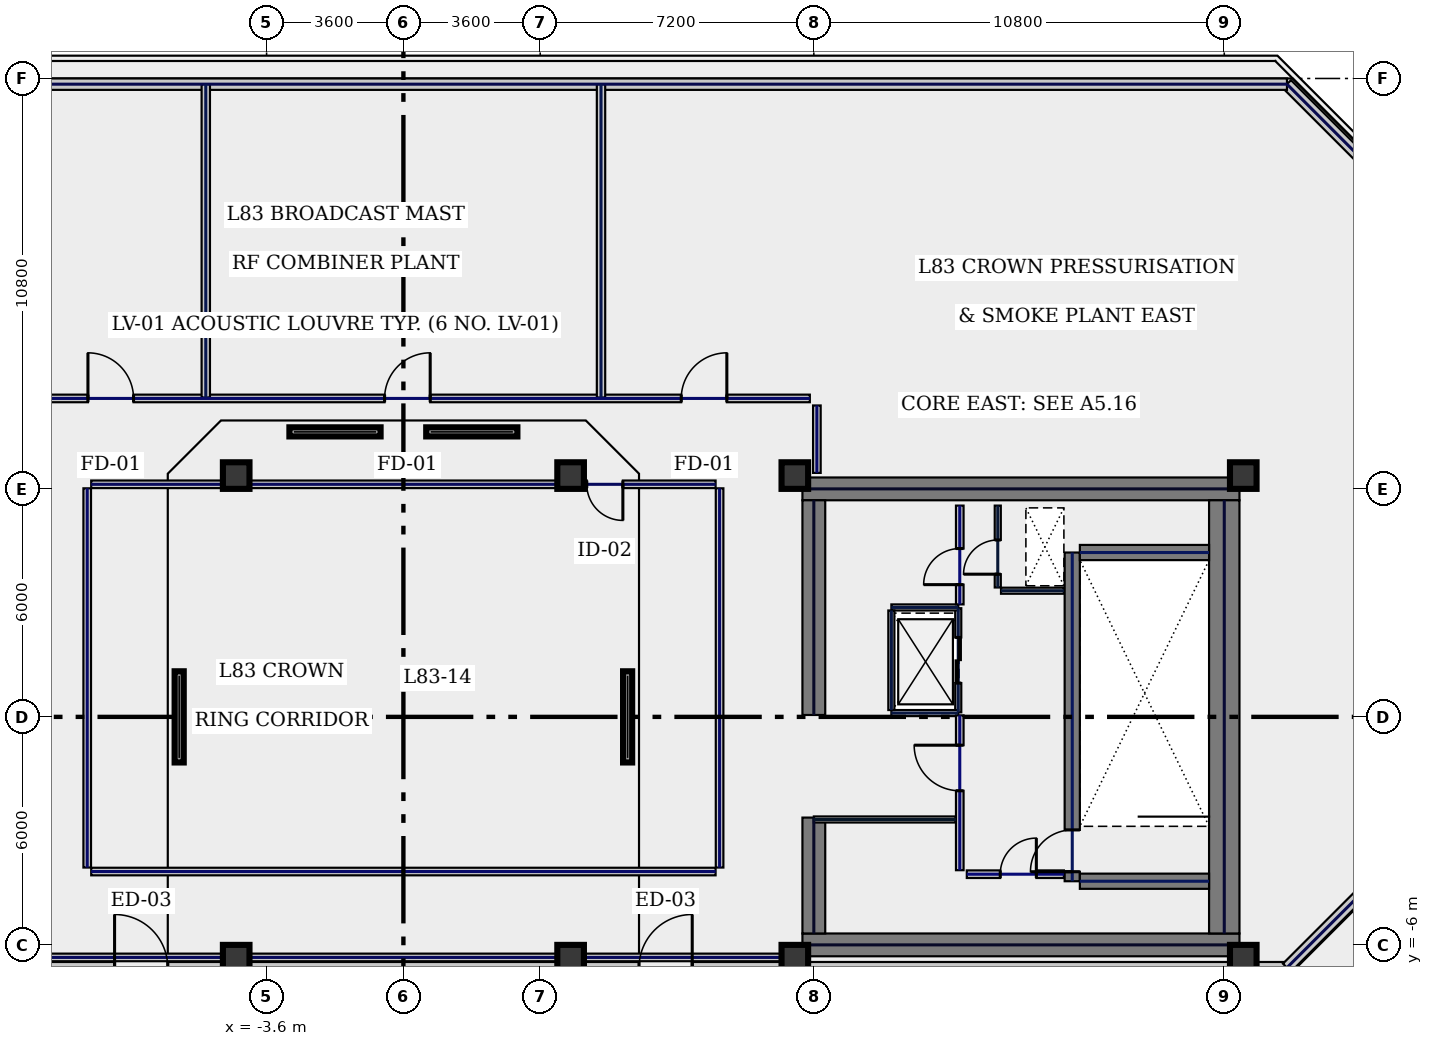
"""IFC4 building model, lengths in metres.
Left out: names, types, materials, properties, quantities, classifications, styles, units other than length and angle.
Written with IfcOpenShell. Run it as: python <this file> out.ifc"""

import sys

from ifc_helpers import new_model, si_unit, direction, frame, frame_2d, origin, origin_2d, place, context, subcontext, project, spatial, rectangle, hollow_rectangle, extrude, element, fill, save


model = new_model("IFC4")
c1 = context("Model", 3, precision=1e-05, world=origin(), true_north=direction((0.0, 1.0)))
c2 = subcontext(c1, "Body", "Model", "MODEL_VIEW")
j1 = project(units=[si_unit("LENGTHUNIT", "METRE"), si_unit("PLANEANGLEUNIT", "RADIAN")], contexts=[c1])
p1 = place(None, origin())
s1 = spatial("IfcSite", under=j1, at=p1, CompositionType="ELEMENT")
p2 = place(p1, origin())
s2 = spatial("IfcBuilding", under=s1, at=p2, CompositionType="ELEMENT")
p3 = place(p2, frame((0.0, 0.0, 357.0)))
s3 = spatial("IfcBuildingStorey", under=s2, at=p3, CompositionType="ELEMENT", Elevation=357.0)
for number, where, z_axis, x_axis in (
    (1, (10.5, 6.0, 0.0), (0.0, 0.0, 1.0), (1.0, 0.0, 0.0)),
    (2, (10.5, -6.0, 0.0), (0.0, 0.0, 1.0), (1.0, 0.0, 0.0)),
):
    element("IfcWall", number, at=place(p3, frame(where, z_axis=z_axis, x_axis=x_axis)), inside=s3, PredefinedType="SHEAR", context=c2, shape_type="SweptSolid", body=[
        extrude(rectangle(XDim=11.5, YDim=0.6, at=frame_2d((5.75, 0.0))), origin(), (0.0, 0.0, 1.0), 3.7),
    ])
p4 = place(p3, frame((21.6, -5.7, 0.0), z_axis=(0.0, 0.0, 1.0), x_axis=(0.0, 1.0, 0.0)))
e3 = element("IfcWall", 3, at=p4, inside=s3, PredefinedType="SHEAR", context=c2, shape_type="SweptSolid", body=[
    extrude(rectangle(XDim=11.4, YDim=0.8, at=frame_2d((5.7, 0.0))), origin(), (0.0, 0.0, 1.0), 3.7),
])
p5 = place(p3, frame((10.8, -5.7, 0.0), z_axis=(0.0, 0.0, 1.0), x_axis=(0.0, 1.0, 0.0)))
e4 = element("IfcWall", 4, at=p5, inside=s3, PredefinedType="SHEAR", context=c2, shape_type="SweptSolid", body=[
    extrude(rectangle(XDim=3.05, YDim=0.6, at=frame_2d((1.525, 0.0))), origin(), (0.0, 0.0, 1.0), 3.7),
])
p6 = place(p3, frame((10.8, 0.05, 0.0), z_axis=(0.0, 0.0, 1.0), x_axis=(0.0, 1.0, 0.0)))
e5 = element("IfcWall", 5, at=p6, inside=s3, PredefinedType="SHEAR", context=c2, shape_type="SweptSolid", body=[
    extrude(rectangle(XDim=5.65, YDim=0.6, at=frame_2d((2.825, 0.0))), origin(), (0.0, 0.0, 1.0), 3.7),
])
p7 = place(p3, frame((17.6, -4.325, 0.0), z_axis=(0.0, 0.0, 1.0), x_axis=(0.0, 1.0, 0.0)))
e6 = element("IfcWall", 6, at=p7, inside=s3, PredefinedType="SHEAR", context=c2, shape_type="SweptSolid", body=[
    extrude(rectangle(XDim=8.65, YDim=0.4, at=frame_2d((4.325, 0.0))), origin(), (0.0, 0.0, 1.0), 3.7),
])
p8 = place(p7, frame((0.25, 0.0, 0.0)))
e7 = element("IfcOpeningElement", 7, at=p8, cuts=e6, PredefinedType="OPENING", context=c2, shape_type="SweptSolid", body=[
    extrude(rectangle(XDim=1.1, YDim=2.2, at=frame_2d((0.55, 1.1))), frame((0.0, 0.21, 0.0), z_axis=(0.0, -1.0, 0.0), x_axis=(1.0, 0.0, 0.0)), (0.0, 0.0, 1.0), 0.42),
])
for number, where, z_axis, x_axis in (
    (8, (17.8, -4.325, 0.0), (0.0, 0.0, 1.0), (1.0, 0.0, 0.0)),
    (9, (17.8, 4.325, 0.0), (0.0, 0.0, 1.0), (1.0, 0.0, 0.0)),
):
    element("IfcWall", number, at=place(p3, frame(where, z_axis=z_axis, x_axis=x_axis)), inside=s3, PredefinedType="SHEAR", context=c2, shape_type="SweptSolid", body=[
        extrude(rectangle(XDim=3.4, YDim=0.4, at=frame_2d((1.7, 0.0))), origin(), (0.0, 0.0, 1.0), 3.7),
    ])
for number, where, z_axis, x_axis in (
    (10, (10.3, -6.35, 0.0), (0.0, 0.0, 1.0), (1.0, 0.0, 0.0)),
    (11, (10.3, 6.35, 0.0), (0.0, 0.0, 1.0), (1.0, 0.0, 0.0)),
    (12, (22.1, -6.35, 0.0), (0.0, 0.0, 1.0), (1.0, 0.0, 0.0)),
    (13, (22.1, 6.35, 0.0), (0.0, 0.0, 1.0), (1.0, 0.0, 0.0)),
    (14, (-4.4, -6.35, 0.0), (0.0, 0.0, 1.0), (1.0, 0.0, 0.0)),
    (15, (4.4, -6.35, 0.0), (0.0, 0.0, 1.0), (1.0, 0.0, 0.0)),
    (16, (-4.4, 6.35, 0.0), (0.0, 0.0, 1.0), (1.0, 0.0, 0.0)),
    (17, (4.4, 6.35, 0.0), (0.0, 0.0, 1.0), (1.0, 0.0, 0.0)),
):
    element("IfcColumn", number, at=place(p3, frame(where, z_axis=z_axis, x_axis=x_axis)), inside=s3, PredefinedType="COLUMN", context=c2, shape_type="SweptSolid", body=[
        extrude(hollow_rectangle(XDim=0.7, YDim=0.7, WallThickness=0.032, at=origin_2d()), origin(), (0.0, 0.0, 1.0), 3.7),
    ])
p9 = place(p3, frame((-23.25, -6.6, 0.0), z_axis=(0.0, 0.0, 1.0), x_axis=(1.0, 0.0, 0.0)))
e18 = element("IfcWall", 18, at=p9, inside=s3, PredefinedType="STANDARD", context=c2, shape_type="SweptSolid", body=[
    extrude(rectangle(XDim=46.5, YDim=0.3, at=frame_2d((23.25, 0.0))), origin(), (0.0, 0.0, 1.0), 2.695),
])
p10 = place(p9, frame((15.65, 0.0, 0.32)))
e19 = element("IfcOpeningElement", 19, at=p10, cuts=e18, PredefinedType="OPENING", context=c2, shape_type="SweptSolid", body=[
    extrude(rectangle(XDim=1.4, YDim=2.2, at=frame_2d((0.7, 1.1))), frame((0.0, 0.16, 0.0), z_axis=(0.0, -1.0, 0.0), x_axis=(1.0, 0.0, 0.0)), (0.0, 0.0, 1.0), 0.32),
])
p11 = place(p9, frame((29.45, 0.0, 0.32)))
e20 = element("IfcOpeningElement", 20, at=p11, cuts=e18, PredefinedType="OPENING", context=c2, shape_type="SweptSolid", body=[
    extrude(rectangle(XDim=1.4, YDim=2.2, at=frame_2d((0.7, 1.1))), frame((0.0, 0.16, 0.0), z_axis=(0.0, -1.0, 0.0), x_axis=(1.0, 0.0, 0.0)), (0.0, 0.0, 1.0), 0.32),
])
for number, where, z_axis, x_axis in (
    (21, (23.25, -6.6, 0.0), (0.0, 0.0, 1.0), (0.707, 0.707, 0.0)),
    (22, (25.25, 14.65, 0.0), (0.0, 0.0, 1.0), (-0.707, 0.707, 0.0)),
):
    element("IfcWall", number, at=place(p3, frame(where, z_axis=z_axis, x_axis=x_axis)), inside=s3, PredefinedType="STANDARD", context=c2, shape_type="SweptSolid", body=[
        extrude(rectangle(XDim=2.828, YDim=0.3, at=frame_2d((1.414, 0.0))), origin(), (0.0, 0.0, 1.0), 3.7),
    ])
p12 = place(p3, frame((23.25, 16.65, 0.0), z_axis=(0.0, 0.0, 1.0), x_axis=(-1.0, 0.0, 0.0)))
e23 = element("IfcWall", 23, at=p12, inside=s3, PredefinedType="STANDARD", context=c2, shape_type="SweptSolid", body=[
    extrude(rectangle(XDim=46.5, YDim=0.3, at=frame_2d((23.25, 0.0))), origin(), (0.0, 0.0, 1.0), 3.7),
])
p13 = place(p3, frame((14.6, 0.12, 0.0), z_axis=(0.0, 0.0, 1.0), x_axis=(0.0, 1.0, 0.0)))
e24 = element("IfcWall", 24, at=p13, inside=s3, PredefinedType="PARTITIONING", context=c2, shape_type="SweptSolid", body=[
    extrude(rectangle(XDim=2.74, YDim=0.16, at=frame_2d((1.37, 0.0))), origin(), (0.0, 0.0, 1.0), 5.5),
])
p14 = place(p13, frame((0.77, 0.0, 0.0)))
e25 = element("IfcOpeningElement", 25, at=p14, cuts=e24, PredefinedType="OPENING", context=c2, shape_type="SweptSolid", body=[
    extrude(rectangle(XDim=1.2, YDim=2.2, at=frame_2d((0.6, 1.1))), frame((0.0, 0.09, 0.0), z_axis=(0.0, -1.0, 0.0), x_axis=(1.0, 0.0, 0.0)), (0.0, 0.0, 1.0), 0.18),
])
for number, where, z_axis, x_axis in (
    (26, (12.84, 0.1, 0.0), (0.0, 0.0, 1.0), (1.0, 0.0, 0.0)),
    (27, (12.84, 2.88, 0.0), (0.0, 0.0, 1.0), (1.0, 0.0, 0.0)),
):
    element("IfcWall", number, at=place(p3, frame(where, z_axis=z_axis, x_axis=x_axis)), inside=s3, PredefinedType="PARTITIONING", context=c2, shape_type="SweptSolid", body=[
        extrude(rectangle(XDim=1.76, YDim=0.16, at=frame_2d((0.88, 0.0))), origin(), (0.0, 0.0, 1.0), 5.5),
    ])
p15 = place(p3, frame((12.84, 0.18, 0.0), z_axis=(0.0, 0.0, 1.0), x_axis=(0.0, 1.0, 0.0)))
e28 = element("IfcWall", 28, at=p15, inside=s3, PredefinedType="PARTITIONING", context=c2, shape_type="SweptSolid", body=[
    extrude(rectangle(XDim=2.62, YDim=0.16, at=frame_2d((1.31, 0.0))), origin(), (0.0, 0.0, 1.0), 5.5),
])
p16 = place(p3, frame((15.64, 3.405, 0.0), z_axis=(0.0, 0.0, 1.0), x_axis=(0.0, 1.0, 0.0)))
e29 = element("IfcWall", 29, at=p16, inside=s3, PredefinedType="PARTITIONING", context=c2, shape_type="SweptSolid", body=[
    extrude(rectangle(XDim=2.155, YDim=0.16, at=frame_2d((1.078, 0.0))), origin(), (0.0, 0.0, 1.0), 3.7),
])
p17 = place(p16, frame((0.35, 0.0, 0.0)))
e30 = element("IfcOpeningElement", 30, at=p17, cuts=e29, PredefinedType="OPENING", context=c2, shape_type="SweptSolid", body=[
    extrude(rectangle(XDim=0.9, YDim=2.2, at=frame_2d((0.45, 1.1))), frame((0.0, 0.09, 0.0), z_axis=(0.0, -1.0, 0.0), x_axis=(1.0, 0.0, 0.0)), (0.0, 0.0, 1.0), 0.18),
])
p18 = place(p3, frame((15.725, 3.32, 0.0), z_axis=(0.0, 0.0, 1.0), x_axis=(1.0, 0.0, 0.0)))
e31 = element("IfcWall", 31, at=p18, inside=s3, PredefinedType="PARTITIONING", context=c2, shape_type="SweptSolid", body=[
    extrude(rectangle(XDim=1.655, YDim=0.16, at=frame_2d((0.827, 0.0))), origin(), (0.0, 0.0, 1.0), 3.7),
])
p19 = place(p3, frame((14.825, -4.14, 0.0), z_axis=(0.0, 0.0, 1.0), x_axis=(1.0, 0.0, 0.0)))
e32 = element("IfcWall", 32, at=p19, inside=s3, PredefinedType="SOLIDWALL", context=c2, shape_type="SweptSolid", body=[
    extrude(rectangle(XDim=2.555, YDim=0.2, at=frame_2d((1.277, 0.0))), origin(), (0.0, 0.0, 1.0), 3.7),
])
p20 = place(p19, frame((0.88, 0.0, 0.0)))
e33 = element("IfcOpeningElement", 33, at=p20, cuts=e32, PredefinedType="OPENING", context=c2, shape_type="SweptSolid", body=[
    extrude(rectangle(XDim=0.95, YDim=2.2, at=frame_2d((0.475, 1.1))), frame((0.0, 0.11, 0.0), z_axis=(0.0, -1.0, 0.0), x_axis=(1.0, 0.0, 0.0)), (0.0, 0.0, 1.0), 0.22),
])
p21 = place(p3, frame((10.8, -2.7, 0.0), z_axis=(0.0, 0.0, 1.0), x_axis=(1.0, 0.0, 0.0)))
e34 = element("IfcWall", 34, at=p21, inside=s3, PredefinedType="PARTITIONING", context=c2, shape_type="SweptSolid", body=[
    extrude(rectangle(XDim=3.735, YDim=0.16, at=frame_2d((1.867, 0.0))), origin(), (0.0, 0.0, 1.0), 3.7),
])
p22 = place(p3, frame((14.64, 2.96, 0.0), z_axis=(0.0, 0.0, 1.0), x_axis=(0.0, 1.0, 0.0)))
e35 = element("IfcWall", 35, at=p22, inside=s3, PredefinedType="SOLIDWALL", context=c2, shape_type="SweptSolid", body=[
    extrude(rectangle(XDim=2.6, YDim=0.2, at=frame_2d((1.3, 0.0))), origin(), (0.0, 0.0, 1.0), 3.7),
])
p23 = place(p22, frame((0.52, 0.0, 0.0)))
e36 = element("IfcOpeningElement", 36, at=p23, cuts=e35, PredefinedType="OPENING", context=c2, shape_type="SweptSolid", body=[
    extrude(rectangle(XDim=0.95, YDim=2.2, at=frame_2d((0.475, 1.1))), frame((0.0, 0.11, 0.0), z_axis=(0.0, -1.0, 0.0), x_axis=(1.0, 0.0, 0.0)), (0.0, 0.0, 1.0), 0.22),
])
p24 = place(p3, frame((14.64, -4.035, 0.0), z_axis=(0.0, 0.0, 1.0), x_axis=(0.0, 1.0, 0.0)))
e37 = element("IfcWall", 37, at=p24, inside=s3, PredefinedType="SOLIDWALL", context=c2, shape_type="SweptSolid", body=[
    extrude(rectangle(XDim=4.075, YDim=0.2, at=frame_2d((2.038, 0.0))), origin(), (0.0, 0.0, 1.0), 3.7),
])
p25 = place(p24, frame((2.09, 0.0, 0.0)))
e38 = element("IfcOpeningElement", 38, at=p25, cuts=e37, PredefinedType="OPENING", context=c2, shape_type="SweptSolid", body=[
    extrude(rectangle(XDim=1.2, YDim=2.2, at=frame_2d((0.6, 1.1))), frame((0.0, 0.11, 0.0), z_axis=(0.0, -1.0, 0.0), x_axis=(1.0, 0.0, 0.0)), (0.0, 0.0, 1.0), 0.22),
])
p26 = place(p3, frame((-10.695, 8.38, 0.0), z_axis=(0.0, 0.0, 1.0), x_axis=(1.0, 0.0, 0.0)))
e39 = element("IfcWall", 39, at=p26, inside=s3, PredefinedType="SOLIDWALL", context=c2, shape_type="SweptSolid", body=[
    extrude(rectangle(XDim=21.39, YDim=0.2, at=frame_2d((10.695, 0.0))), origin(), (0.0, 0.0, 1.0), 3.7),
])
p27 = place(p26, frame((10.2, 0.0, 0.0)))
e40 = element("IfcOpeningElement", 40, at=p27, cuts=e39, PredefinedType="OPENING", context=c2, shape_type="SweptSolid", body=[
    extrude(rectangle(XDim=1.2, YDim=2.2, at=frame_2d((0.6, 1.1))), frame((0.0, 0.11, 0.0), z_axis=(0.0, -1.0, 0.0), x_axis=(1.0, 0.0, 0.0)), (0.0, 0.0, 1.0), 0.22),
])
p28 = place(p26, frame((2.394, 0.0, 0.0)))
e41 = element("IfcOpeningElement", 41, at=p28, cuts=e39, PredefinedType="OPENING", context=c2, shape_type="SweptSolid", body=[
    extrude(rectangle(XDim=1.2, YDim=2.2, at=frame_2d((0.6, 1.1))), frame((0.0, 0.11, 0.0), z_axis=(0.0, -1.0, 0.0), x_axis=(1.0, 0.0, 0.0)), (0.0, 0.0, 1.0), 0.22),
])
p29 = place(p26, frame((18.006, 0.0, 0.0)))
e42 = element("IfcOpeningElement", 42, at=p29, cuts=e39, PredefinedType="OPENING", context=c2, shape_type="SweptSolid", body=[
    extrude(rectangle(XDim=1.2, YDim=2.2, at=frame_2d((0.6, 1.1))), frame((0.0, 0.11, 0.0), z_axis=(0.0, -1.0, 0.0), x_axis=(1.0, 0.0, 0.0)), (0.0, 0.0, 1.0), 0.22),
])
p30 = place(p3, frame((10.88, 8.195, 0.0), z_axis=(0.0, 0.0, 1.0), x_axis=(0.0, -1.0, 0.0)))
e43 = element("IfcWall", 43, at=p30, inside=s3, PredefinedType="SOLIDWALL", context=c2, shape_type="SweptSolid", body=[
    extrude(rectangle(XDim=1.775, YDim=0.2, at=frame_2d((0.888, 0.0))), origin(), (0.0, 0.0, 1.0), 3.7),
])
p31 = place(p3, frame((10.38, -6.33, 0.0), z_axis=(0.0, 0.0, 1.0), x_axis=(-1.0, 0.0, 0.0)))
e44 = element("IfcWall", 44, at=p31, inside=s3, PredefinedType="SOLIDWALL", context=c2, shape_type="SweptSolid", body=[
    extrude(rectangle(XDim=20.76, YDim=0.2, at=frame_2d((10.38, 0.0))), origin(), (0.0, 0.0, 1.0), 2.695),
])
p32 = place(p3, frame((8.32, -3.965, 0.0), z_axis=(0.0, 0.0, 1.0), x_axis=(0.0, 1.0, 0.0)))
e45 = element("IfcWall", 45, at=p32, inside=s3, PredefinedType="SOLIDWALL", context=c2, shape_type="SweptSolid", body=[
    extrude(rectangle(XDim=9.98, YDim=0.2, at=frame_2d((4.99, 0.0))), origin(), (0.0, 0.0, 1.0), 3.7),
])
p33 = place(p3, frame((8.215, 6.12, 0.0), z_axis=(0.0, 0.0, 1.0), x_axis=(-1.0, 0.0, 0.0)))
e46 = element("IfcWall", 46, at=p33, inside=s3, PredefinedType="SOLIDWALL", context=c2, shape_type="SweptSolid", body=[
    extrude(rectangle(XDim=16.43, YDim=0.2, at=frame_2d((8.215, 0.0))), origin(), (0.0, 0.0, 1.0), 2.695),
])
p34 = place(p33, frame((2.44, 0.0, 0.0)))
e47 = element("IfcOpeningElement", 47, at=p34, cuts=e46, PredefinedType="OPENING", context=c2, shape_type="SweptSolid", body=[
    extrude(rectangle(XDim=0.95, YDim=2.2, at=frame_2d((0.475, 1.1))), frame((0.0, 0.11, 0.0), z_axis=(0.0, -1.0, 0.0), x_axis=(1.0, 0.0, 0.0)), (0.0, 0.0, 1.0), 0.22),
])
p35 = place(p3, frame((-8.32, 6.015, 0.0), z_axis=(0.0, 0.0, 1.0), x_axis=(0.0, -1.0, 0.0)))
e48 = element("IfcWall", 48, at=p35, inside=s3, PredefinedType="SOLIDWALL", context=c2, shape_type="SweptSolid", body=[
    extrude(rectangle(XDim=9.98, YDim=0.2, at=frame_2d((4.99, 0.0))), origin(), (0.0, 0.0, 1.0), 3.7),
])
p36 = place(p3, frame((-8.215, -4.07, 0.0), z_axis=(0.0, 0.0, 1.0), x_axis=(1.0, 0.0, 0.0)))
e49 = element("IfcWall", 49, at=p36, inside=s3, PredefinedType="SOLIDWALL", context=c2, shape_type="SweptSolid", body=[
    extrude(rectangle(XDim=16.43, YDim=0.2, at=frame_2d((8.215, 0.0))), origin(), (0.0, 0.0, 1.0), 3.7),
])
for number, where, z_axis, x_axis in (
    (50, (-5.2, 8.405, 0.0), (0.0, 0.0, 1.0), (0.0, 1.0, 0.0)),
    (51, (5.2, 8.405, 0.0), (0.0, 0.0, 1.0), (0.0, 1.0, 0.0)),
):
    element("IfcWall", number, at=place(p3, frame(where, z_axis=z_axis, x_axis=x_axis)), inside=s3, PredefinedType="SOLIDWALL", context=c2, shape_type="SweptSolid", body=[
        extrude(rectangle(XDim=8.245, YDim=0.22, at=frame_2d((4.123, 0.0))), origin(), (0.0, 0.0, 1.0), 3.7),
    ])
p37 = place(p8, origin())
e52 = element("IfcDoor", 52, at=p37, inside=s3, OperationType="SINGLE_SWING_LEFT", PredefinedType="DOOR", context=c2, shape_type="SweptSolid", body=[
    extrude(rectangle(XDim=1.1, YDim=2.2, at=frame_2d((0.55, 1.1))), frame((0.0, 0.025, 0.0), z_axis=(0.0, -1.0, 0.0), x_axis=(1.0, 0.0, 0.0)), (0.0, 0.0, 1.0), 0.05),
])
fill(e7, e52)
p38 = place(p14, origin())
e53 = element("IfcDoor", 53, at=p38, inside=s3, OperationType="SLIDING_TO_LEFT", PredefinedType="DOOR", context=c2, shape_type="SweptSolid", body=[
    extrude(rectangle(XDim=1.2, YDim=2.2, at=frame_2d((0.6, 1.1))), frame((0.0, 0.025, 0.0), z_axis=(0.0, -1.0, 0.0), x_axis=(1.0, 0.0, 0.0)), (0.0, 0.0, 1.0), 0.05),
])
fill(e25, e53)
p39 = place(p17, origin())
e54 = element("IfcDoor", 54, at=p39, inside=s3, OperationType="SINGLE_SWING_LEFT", PredefinedType="DOOR", context=c2, shape_type="SweptSolid", body=[
    extrude(rectangle(XDim=0.9, YDim=2.2, at=frame_2d((0.45, 1.1))), frame((0.0, 0.025, 0.0), z_axis=(0.0, -1.0, 0.0), x_axis=(1.0, 0.0, 0.0)), (0.0, 0.0, 1.0), 0.05),
])
fill(e30, e54)
p40 = place(p20, origin())
e55 = element("IfcDoor", 55, at=p40, inside=s3, OperationType="SINGLE_SWING_RIGHT", PredefinedType="DOOR", context=c2, shape_type="SweptSolid", body=[
    extrude(rectangle(XDim=0.95, YDim=2.2, at=frame_2d((0.475, 1.1))), frame((0.0, 0.025, 0.0), z_axis=(0.0, -1.0, 0.0), x_axis=(1.0, 0.0, 0.0)), (0.0, 0.0, 1.0), 0.05),
])
fill(e33, e55)
p41 = place(p23, origin())
e56 = element("IfcDoor", 56, at=p41, inside=s3, OperationType="SINGLE_SWING_LEFT", PredefinedType="DOOR", context=c2, shape_type="SweptSolid", body=[
    extrude(rectangle(XDim=0.95, YDim=2.2, at=frame_2d((0.475, 1.1))), frame((0.0, 0.025, 0.0), z_axis=(0.0, -1.0, 0.0), x_axis=(1.0, 0.0, 0.0)), (0.0, 0.0, 1.0), 0.05),
])
fill(e36, e56)
p42 = place(p25, origin())
e57 = element("IfcDoor", 57, at=p42, inside=s3, OperationType="SINGLE_SWING_RIGHT", PredefinedType="DOOR", context=c2, shape_type="SweptSolid", body=[
    extrude(rectangle(XDim=1.2, YDim=2.2, at=frame_2d((0.6, 1.1))), frame((0.0, 0.025, 0.0), z_axis=(0.0, -1.0, 0.0), x_axis=(1.0, 0.0, 0.0)), (0.0, 0.0, 1.0), 0.05),
])
fill(e38, e57)
p43 = place(p34, origin())
e58 = element("IfcDoor", 58, at=p43, inside=s3, OperationType="SINGLE_SWING_LEFT", PredefinedType="DOOR", context=c2, shape_type="SweptSolid", body=[
    extrude(rectangle(XDim=0.95, YDim=2.2, at=frame_2d((0.475, 1.1))), frame((0.0, 0.025, 0.0), z_axis=(0.0, -1.0, 0.0), x_axis=(1.0, 0.0, 0.0)), (0.0, 0.0, 1.0), 0.05),
])
fill(e47, e58)
p44 = place(p27, origin())
e59 = element("IfcDoor", 59, at=p44, inside=s3, OperationType="SINGLE_SWING_RIGHT", PredefinedType="DOOR", context=c2, shape_type="SweptSolid", body=[
    extrude(rectangle(XDim=1.2, YDim=2.2, at=frame_2d((0.6, 1.1))), frame((0.0, 0.025, 0.0), z_axis=(0.0, -1.0, 0.0), x_axis=(1.0, 0.0, 0.0)), (0.0, 0.0, 1.0), 0.05),
])
fill(e40, e59)
p45 = place(p28, origin())
e60 = element("IfcDoor", 60, at=p45, inside=s3, OperationType="SINGLE_SWING_LEFT", PredefinedType="DOOR", context=c2, shape_type="SweptSolid", body=[
    extrude(rectangle(XDim=1.2, YDim=2.2, at=frame_2d((0.6, 1.1))), frame((0.0, 0.025, 0.0), z_axis=(0.0, -1.0, 0.0), x_axis=(1.0, 0.0, 0.0)), (0.0, 0.0, 1.0), 0.05),
])
fill(e41, e60)
p46 = place(p29, origin())
e61 = element("IfcDoor", 61, at=p46, inside=s3, OperationType="SINGLE_SWING_RIGHT", PredefinedType="DOOR", context=c2, shape_type="SweptSolid", body=[
    extrude(rectangle(XDim=1.2, YDim=2.2, at=frame_2d((0.6, 1.1))), frame((0.0, 0.025, 0.0), z_axis=(0.0, -1.0, 0.0), x_axis=(1.0, 0.0, 0.0)), (0.0, 0.0, 1.0), 0.05),
])
fill(e42, e61)
save(model, sys.argv[1])
